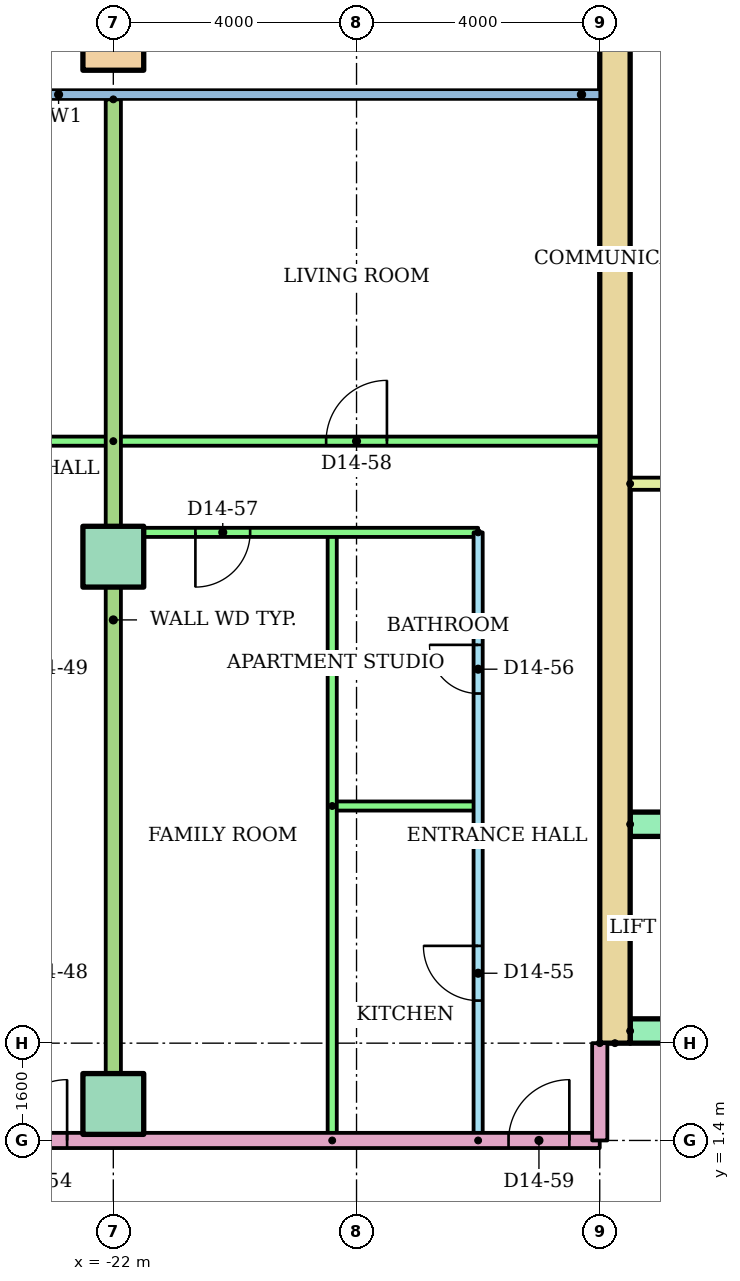
"""IFC4 building model, lengths in metres.
Left out: names, types, materials, properties, quantities, classifications, styles, units other than length and angle.
Written with IfcOpenShell. Run it as: python <this file> out.ifc"""

import sys

from ifc_helpers import new_model, si_unit, direction, frame, frame_2d, origin, origin_2d, place, context, subcontext, project, spatial, rectangle, hollow_rectangle, extrude, element, fill, save


model = new_model("IFC4")
c1 = context("Model", 3, precision=1e-05, world=origin(), true_north=direction((0.0, 1.0)))
c2 = subcontext(c1, "Body", "Model", "MODEL_VIEW")
j1 = project(units=[si_unit("LENGTHUNIT", "METRE"), si_unit("PLANEANGLEUNIT", "RADIAN")], contexts=[c1])
p1 = place(None, origin())
s1 = spatial("IfcSite", under=j1, at=p1, CompositionType="ELEMENT")
p2 = place(p1, origin())
s2 = spatial("IfcBuilding", under=s1, at=p2, CompositionType="ELEMENT")
p3 = place(p2, frame((0.0, 0.0, 54.4)))
s3 = spatial("IfcBuildingStorey", under=s2, at=p3, CompositionType="ELEMENT", Elevation=54.4)
for number, where in (
    (1, (-22.0, 2.0, 0.0)),
    (2, (-22.0, 11.0, 0.0)),
):
    element("IfcColumn", number, at=place(p3, frame(where)), inside=s3, PredefinedType="COLUMN", context=c2, shape_type="SweptSolid", body=[
        extrude(rectangle(XDim=1.0, YDim=1.0, at=origin_2d()), origin(), (0.0, 0.0, 1.0), 3.2),
    ])
p4 = place(p3, frame((-22.0, 19.5, 0.0)))
e3 = element("IfcColumn", 3, at=p4, inside=s3, PredefinedType="COLUMN", context=c2, shape_type="SweptSolid", body=[
    extrude(hollow_rectangle(XDim=1.0, YDim=1.0, WallThickness=0.05, at=origin_2d()), origin(), (0.0, 0.0, 1.0), 3.2),
])
p5 = place(p3, frame((-13.75, 3.0, 0.0), z_axis=(0.0, 0.0, 1.0), x_axis=(0.0, 1.0, 0.0)))
e4 = element("IfcWall", 4, at=p5, inside=s3, PredefinedType="SHEAR", context=c2, shape_type="SweptSolid", body=[
    extrude(rectangle(XDim=17.0, YDim=0.5, at=frame_2d((8.5, 0.0))), origin(), (0.0, 0.0, 1.0), 2.92),
])
p6 = place(p3, frame((-13.5, 3.2, 0.0)))
e5 = element("IfcWall", 5, at=p6, inside=s3, PredefinedType="SHEAR", context=c2, shape_type="SweptSolid", body=[
    extrude(rectangle(XDim=27.0, YDim=0.4, at=frame_2d((13.5, 0.0))), origin(), (0.0, 0.0, 1.0), 2.92),
])
p7 = place(p6, frame((6.861, 0.0, 0.0)))
e6 = element("IfcOpeningElement", 6, at=p7, cuts=e5, PredefinedType="OPENING", context=c2, shape_type="SweptSolid", body=[
    extrude(rectangle(XDim=1.1, YDim=2.1, at=frame_2d((0.55, 1.05))), frame((0.0, 0.21, 0.0), z_axis=(0.0, -1.0, 0.0), x_axis=(1.0, 0.0, 0.0)), (0.0, 0.0, 1.0), 0.42),
])
p8 = place(p6, frame((9.906, 0.0, 0.0)))
e7 = element("IfcOpeningElement", 7, at=p8, cuts=e5, PredefinedType="OPENING", context=c2, shape_type="SweptSolid", body=[
    extrude(rectangle(XDim=1.1, YDim=2.1, at=frame_2d((0.55, 1.05))), frame((0.0, 0.21, 0.0), z_axis=(0.0, -1.0, 0.0), x_axis=(1.0, 0.0, 0.0)), (0.0, 0.0, 1.0), 0.42),
])
p9 = place(p6, frame((15.994, 0.0, 0.0)))
e8 = element("IfcOpeningElement", 8, at=p9, cuts=e5, PredefinedType="OPENING", context=c2, shape_type="SweptSolid", body=[
    extrude(rectangle(XDim=1.1, YDim=2.1, at=frame_2d((0.55, 1.05))), frame((0.0, 0.21, 0.0), z_axis=(0.0, -1.0, 0.0), x_axis=(1.0, 0.0, 0.0)), (0.0, 0.0, 1.0), 0.42),
])
p10 = place(p6, frame((19.039, 0.0, 0.0)))
e9 = element("IfcOpeningElement", 9, at=p10, cuts=e5, PredefinedType="OPENING", context=c2, shape_type="SweptSolid", body=[
    extrude(rectangle(XDim=1.1, YDim=2.1, at=frame_2d((0.55, 1.05))), frame((0.0, 0.21, 0.0), z_axis=(0.0, -1.0, 0.0), x_axis=(1.0, 0.0, 0.0)), (0.0, 0.0, 1.0), 0.42),
])
p11 = place(p6, frame((12.6, 0.0, 0.0)))
e10 = element("IfcOpeningElement", 10, at=p11, cuts=e5, PredefinedType="OPENING", context=c2, shape_type="SweptSolid", body=[
    extrude(rectangle(XDim=1.8, YDim=2.1, at=frame_2d((0.9, 1.05))), frame((0.0, 0.21, 0.0), z_axis=(0.0, -1.0, 0.0), x_axis=(1.0, 0.0, 0.0)), (0.0, 0.0, 1.0), 0.42),
])
p12 = place(p3, frame((-13.5, 6.6, 0.0)))
e11 = element("IfcWall", 11, at=p12, inside=s3, PredefinedType="SHEAR", context=c2, shape_type="SweptSolid", body=[
    extrude(rectangle(XDim=11.978, YDim=0.4, at=frame_2d((5.989, 0.0))), origin(), (0.0, 0.0, 1.0), 2.92),
])
p13 = place(p3, frame((-13.5, 12.2, 0.0)))
e12 = element("IfcWall", 12, at=p13, inside=s3, PredefinedType="PARTITIONING", context=c2, shape_type="SweptSolid", body=[
    extrude(rectangle(XDim=3.9, YDim=0.2, at=frame_2d((1.95, 0.0))), origin(), (0.0, 0.0, 1.0), 2.92),
])
p14 = place(p3, frame((-36.52, 12.9, 0.0)))
e13 = element("IfcWall", 13, at=p14, inside=s3, PredefinedType="PARTITIONING", context=c2, shape_type="SweptSolid", body=[
    extrude(rectangle(XDim=14.52, YDim=0.15, at=frame_2d((7.26, 0.0))), origin(), (0.0, 0.0, 1.0), 2.4),
])
p15 = place(p14, frame((1.97, 0.0, 0.0)))
e14 = element("IfcOpeningElement", 14, at=p15, cuts=e13, PredefinedType="OPENING", context=c2, shape_type="SweptSolid", body=[
    extrude(rectangle(XDim=1.0, YDim=2.1, at=frame_2d((0.5, 1.05))), frame((0.0, 0.085, 0.0), z_axis=(0.0, -1.0, 0.0), x_axis=(1.0, 0.0, 0.0)), (0.0, 0.0, 1.0), 0.17),
])
p16 = place(p14, frame((9.12, 0.0, 0.0)))
e15 = element("IfcOpeningElement", 15, at=p16, cuts=e13, PredefinedType="OPENING", context=c2, shape_type="SweptSolid", body=[
    extrude(rectangle(XDim=1.0, YDim=2.1, at=frame_2d((0.5, 1.05))), frame((0.0, 0.085, 0.0), z_axis=(0.0, -1.0, 0.0), x_axis=(1.0, 0.0, 0.0)), (0.0, 0.0, 1.0), 0.17),
])
p17 = place(p3, frame((-16.0, 1.4, 0.0), z_axis=(0.0, 0.0, 1.0), x_axis=(0.0, 1.0, 0.0)))
e16 = element("IfcWall", 16, at=p17, inside=s3, PredefinedType="PARTITIONING", context=c2, shape_type="SweptSolid", body=[
    extrude(rectangle(XDim=10.0, YDim=0.15, at=frame_2d((5.0, 0.0))), origin(), (0.0, 0.0, 1.0), 2.4),
])
p18 = place(p17, frame((2.3, 0.0, 0.0)))
e17 = element("IfcOpeningElement", 17, at=p18, cuts=e16, PredefinedType="OPENING", context=c2, shape_type="SweptSolid", body=[
    extrude(rectangle(XDim=0.9, YDim=2.1, at=frame_2d((0.45, 1.05))), frame((0.0, 0.085, 0.0), z_axis=(0.0, -1.0, 0.0), x_axis=(1.0, 0.0, 0.0)), (0.0, 0.0, 1.0), 0.17),
])
p19 = place(p17, frame((7.35, 0.0, 0.0)))
e18 = element("IfcOpeningElement", 18, at=p19, cuts=e16, PredefinedType="OPENING", context=c2, shape_type="SweptSolid", body=[
    extrude(rectangle(XDim=0.8, YDim=2.1, at=frame_2d((0.4, 1.05))), frame((0.0, 0.085, 0.0), z_axis=(0.0, -1.0, 0.0), x_axis=(1.0, 0.0, 0.0)), (0.0, 0.0, 1.0), 0.17),
])
p20 = place(p3, frame((-18.4, 6.9, 0.0)))
e19 = element("IfcWall", 19, at=p20, inside=s3, PredefinedType="PARTITIONING", context=c2, shape_type="SweptSolid", body=[
    extrude(rectangle(XDim=2.4, YDim=0.15, at=frame_2d((1.2, 0.0))), origin(), (0.0, 0.0, 1.0), 2.4),
])
p21 = place(p3, frame((-18.4, 1.4, 0.0), z_axis=(0.0, 0.0, 1.0), x_axis=(0.0, 1.0, 0.0)))
e20 = element("IfcWall", 20, at=p21, inside=s3, PredefinedType="PARTITIONING", context=c2, shape_type="SweptSolid", body=[
    extrude(rectangle(XDim=10.0, YDim=0.15, at=frame_2d((5.0, 0.0))), origin(), (0.0, 0.0, 1.0), 2.4),
])
p22 = place(p3, frame((-16.0, 11.4, 0.0), z_axis=(0.0, 0.0, 1.0), x_axis=(-1.0, 0.0, 0.0)))
e21 = element("IfcWall", 21, at=p22, inside=s3, PredefinedType="PARTITIONING", context=c2, shape_type="SweptSolid", body=[
    extrude(rectangle(XDim=6.0, YDim=0.15, at=frame_2d((3.0, 0.0))), origin(), (0.0, 0.0, 1.0), 2.4),
])
p23 = place(p22, frame((3.75, 0.0, 0.0)))
e22 = element("IfcOpeningElement", 22, at=p23, cuts=e21, PredefinedType="OPENING", context=c2, shape_type="SweptSolid", body=[
    extrude(rectangle(XDim=0.9, YDim=2.1, at=frame_2d((0.45, 1.05))), frame((0.0, 0.085, 0.0), z_axis=(0.0, -1.0, 0.0), x_axis=(1.0, 0.0, 0.0)), (0.0, 0.0, 1.0), 0.17),
])
p24 = place(p3, frame((-22.0, 12.9, 0.0)))
e23 = element("IfcWall", 23, at=p24, inside=s3, PredefinedType="PARTITIONING", context=c2, shape_type="SweptSolid", body=[
    extrude(rectangle(XDim=8.0, YDim=0.15, at=frame_2d((4.0, 0.0))), origin(), (0.0, 0.0, 1.0), 2.4),
])
p25 = place(p24, frame((3.5, 0.0, 0.0)))
e24 = element("IfcOpeningElement", 24, at=p25, cuts=e23, PredefinedType="OPENING", context=c2, shape_type="SweptSolid", body=[
    extrude(rectangle(XDim=1.0, YDim=2.1, at=frame_2d((0.5, 1.05))), frame((0.0, 0.085, 0.0), z_axis=(0.0, -1.0, 0.0), x_axis=(1.0, 0.0, 0.0)), (0.0, 0.0, 1.0), 0.17),
])
p26 = place(p3, frame((-22.0, 18.521, 0.0), z_axis=(0.0, 0.0, 1.0), x_axis=(0.0, -1.0, 0.0)))
e25 = element("IfcWall", 25, at=p26, inside=s3, PredefinedType="PARTITIONING", context=c2, shape_type="SweptSolid", body=[
    extrude(rectangle(XDim=17.121, YDim=0.25, at=frame_2d((8.561, 0.0))), origin(), (0.0, 0.0, 1.0), 2.4),
])
p27 = place(p3, frame((-29.0, 1.4, 0.0)))
e26 = element("IfcWall", 26, at=p27, inside=s3, PredefinedType="PARTITIONING", context=c2, shape_type="SweptSolid", body=[
    extrude(rectangle(XDim=15.0, YDim=0.25, at=frame_2d((7.5, 0.0))), origin(), (0.0, 0.0, 1.0), 2.4),
])
p28 = place(p27, frame((5.24, 0.0, 0.0)))
e27 = element("IfcOpeningElement", 27, at=p28, cuts=e26, PredefinedType="OPENING", context=c2, shape_type="SweptSolid", body=[
    extrude(rectangle(XDim=1.0, YDim=2.1, at=frame_2d((0.5, 1.05))), frame((0.0, 0.135, 0.0), z_axis=(0.0, -1.0, 0.0), x_axis=(1.0, 0.0, 0.0)), (0.0, 0.0, 1.0), 0.27),
])
p29 = place(p27, frame((13.5, 0.0, 0.0)))
e28 = element("IfcOpeningElement", 28, at=p29, cuts=e26, PredefinedType="OPENING", context=c2, shape_type="SweptSolid", body=[
    extrude(rectangle(XDim=1.0, YDim=2.1, at=frame_2d((0.5, 1.05))), frame((0.0, 0.135, 0.0), z_axis=(0.0, -1.0, 0.0), x_axis=(1.0, 0.0, 0.0)), (0.0, 0.0, 1.0), 0.27),
])
p30 = place(p3, frame((-14.0, 3.0, 0.0), z_axis=(0.0, 0.0, 1.0), x_axis=(0.0, -1.0, 0.0)))
e29 = element("IfcWall", 29, at=p30, inside=s3, PredefinedType="PARTITIONING", context=c2, shape_type="SweptSolid", body=[
    extrude(rectangle(XDim=1.6, YDim=0.25, at=frame_2d((0.8, 0.0))), origin(), (0.0, 0.0, 1.0), 2.4),
])
p31 = place(p28, origin())
e30 = element("IfcDoor", 30, at=p31, inside=s3, OperationType="SINGLE_SWING_RIGHT", PredefinedType="DOOR", context=c2, shape_type="SweptSolid", body=[
    extrude(rectangle(XDim=1.0, YDim=2.1, at=frame_2d((0.5, 1.05))), frame((0.0, 0.025, 0.0), z_axis=(0.0, -1.0, 0.0), x_axis=(1.0, 0.0, 0.0)), (0.0, 0.0, 1.0), 0.05),
])
fill(e27, e30)
p32 = place(p18, origin())
e31 = element("IfcDoor", 31, at=p32, inside=s3, OperationType="SINGLE_SWING_RIGHT", PredefinedType="DOOR", context=c2, shape_type="SweptSolid", body=[
    extrude(rectangle(XDim=0.9, YDim=2.1, at=frame_2d((0.45, 1.05))), frame((0.0, 0.025, 0.0), z_axis=(0.0, -1.0, 0.0), x_axis=(1.0, 0.0, 0.0)), (0.0, 0.0, 1.0), 0.05),
])
fill(e17, e31)
p33 = place(p19, origin())
e32 = element("IfcDoor", 32, at=p33, inside=s3, OperationType="SINGLE_SWING_RIGHT", PredefinedType="DOOR", context=c2, shape_type="SweptSolid", body=[
    extrude(rectangle(XDim=0.8, YDim=2.1, at=frame_2d((0.4, 1.05))), frame((0.0, 0.025, 0.0), z_axis=(0.0, -1.0, 0.0), x_axis=(1.0, 0.0, 0.0)), (0.0, 0.0, 1.0), 0.05),
])
fill(e18, e32)
p34 = place(p23, origin())
e33 = element("IfcDoor", 33, at=p34, inside=s3, OperationType="SINGLE_SWING_RIGHT", PredefinedType="DOOR", context=c2, shape_type="SweptSolid", body=[
    extrude(rectangle(XDim=0.9, YDim=2.1, at=frame_2d((0.45, 1.05))), frame((0.0, 0.025, 0.0), z_axis=(0.0, -1.0, 0.0), x_axis=(1.0, 0.0, 0.0)), (0.0, 0.0, 1.0), 0.05),
])
fill(e22, e33)
p35 = place(p25, origin())
e34 = element("IfcDoor", 34, at=p35, inside=s3, OperationType="SINGLE_SWING_RIGHT", PredefinedType="DOOR", context=c2, shape_type="SweptSolid", body=[
    extrude(rectangle(XDim=1.0, YDim=2.1, at=frame_2d((0.5, 1.05))), frame((0.0, 0.025, 0.0), z_axis=(0.0, -1.0, 0.0), x_axis=(1.0, 0.0, 0.0)), (0.0, 0.0, 1.0), 0.05),
])
fill(e24, e34)
p36 = place(p29, origin())
e35 = element("IfcDoor", 35, at=p36, inside=s3, OperationType="SINGLE_SWING_RIGHT", PredefinedType="DOOR", context=c2, shape_type="SweptSolid", body=[
    extrude(rectangle(XDim=1.0, YDim=2.1, at=frame_2d((0.5, 1.05))), frame((0.0, 0.025, 0.0), z_axis=(0.0, -1.0, 0.0), x_axis=(1.0, 0.0, 0.0)), (0.0, 0.0, 1.0), 0.05),
])
fill(e28, e35)
save(model, sys.argv[1])
